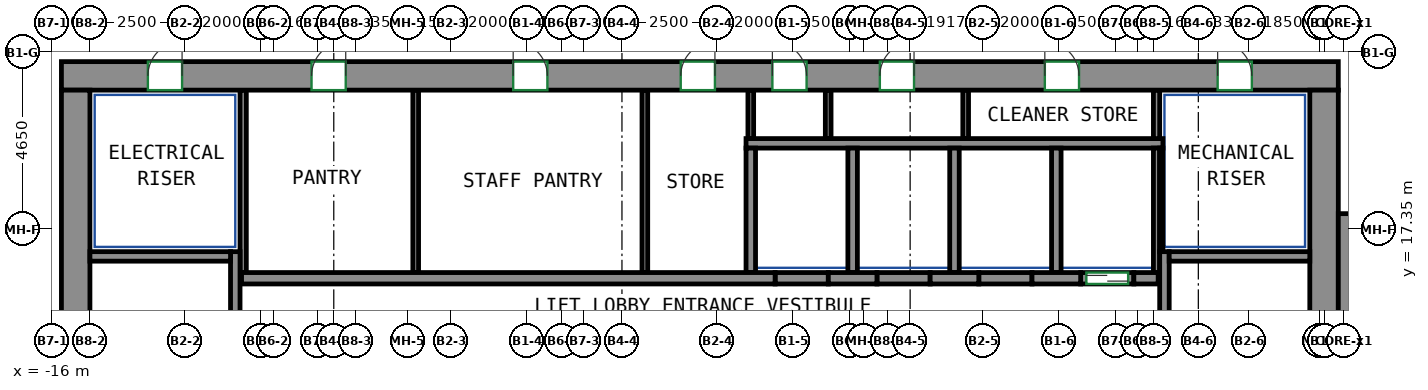
"""IFC4 building model, lengths in metres.
Left out: names, types, materials, properties, quantities, classifications, styles, units other than length and angle.
Written with IfcOpenShell. Run it as: python <this file> out.ifc"""

import sys

from ifc_helpers import new_model, si_unit, direction, frame, frame_2d, origin, place, context, subcontext, project, spatial, rectangle, extrude, source, transform, mapped, element, fill, save


model = new_model("IFC4")
c1 = context("Model", 3, precision=1e-05, world=origin(), true_north=direction((0.0, 1.0)))
c2 = subcontext(c1, "Body", "Model", "MODEL_VIEW")
j1 = project(units=[si_unit("LENGTHUNIT", "METRE"), si_unit("PLANEANGLEUNIT", "RADIAN")], contexts=[c1])
p1 = place(None, origin())
s1 = spatial("IfcSite", under=j1, at=p1, CompositionType="ELEMENT")
p2 = place(p1, origin())
s2 = spatial("IfcBuilding", under=s1, at=p2, CompositionType="ELEMENT")
p3 = place(p2, frame((0.0, 0.0, 192.3)))
s3 = spatial("IfcBuildingStorey", under=s2, at=p3, CompositionType="ELEMENT", Elevation=192.3)
m1 = source(origin(), c2, "Body", "SweptSolid", [
    extrude(rectangle(XDim=33.6, YDim=0.75, at=frame_2d((16.8, 0.0))), origin(), (0.0, 0.0, 1.0), 3.0),
])
p4 = place(p3, frame((-15.75, 21.375, 0.0), z_axis=(0.0, 0.0, 1.0), x_axis=(1.0, 0.0, 0.0)))
e1 = element("IfcWall", 1, at=p4, inside=s3, PredefinedType="SHEAR", context=c2, shape_type="MappedRepresentation", body=[
    mapped(m1, transform((0.0, 0.0, 0.0))),
])
p5 = place(p4, frame((6.581, 0.0, 0.0)))
e2 = element("IfcOpeningElement", 2, at=p5, cuts=e1, PredefinedType="OPENING", context=c2, shape_type="SweptSolid", body=[
    extrude(rectangle(XDim=0.9, YDim=2.1, at=frame_2d((0.45, 1.05))), frame((0.0, 0.385, 0.0), z_axis=(0.0, -1.0, 0.0), x_axis=(1.0, 0.0, 0.0)), (0.0, 0.0, 1.0), 0.77),
])
p6 = place(p4, frame((11.888, 0.0, 0.0)))
e3 = element("IfcOpeningElement", 3, at=p6, cuts=e1, PredefinedType="OPENING", context=c2, shape_type="SweptSolid", body=[
    extrude(rectangle(XDim=0.9, YDim=2.1, at=frame_2d((0.45, 1.05))), frame((0.0, 0.385, 0.0), z_axis=(0.0, -1.0, 0.0), x_axis=(1.0, 0.0, 0.0)), (0.0, 0.0, 1.0), 0.77),
])
p7 = place(p4, frame((16.296, 0.0, 0.0)))
e4 = element("IfcOpeningElement", 4, at=p7, cuts=e1, PredefinedType="OPENING", context=c2, shape_type="SweptSolid", body=[
    extrude(rectangle(XDim=0.9, YDim=2.1, at=frame_2d((0.45, 1.05))), frame((0.0, 0.385, 0.0), z_axis=(0.0, -1.0, 0.0), x_axis=(1.0, 0.0, 0.0)), (0.0, 0.0, 1.0), 0.77),
])
p8 = place(p4, frame((18.708, 0.0, 0.0)))
e5 = element("IfcOpeningElement", 5, at=p8, cuts=e1, PredefinedType="OPENING", context=c2, shape_type="SweptSolid", body=[
    extrude(rectangle(XDim=0.9, YDim=2.1, at=frame_2d((0.45, 1.05))), frame((0.0, 0.385, 0.0), z_axis=(0.0, -1.0, 0.0), x_axis=(1.0, 0.0, 0.0)), (0.0, 0.0, 1.0), 0.77),
])
p9 = place(p4, frame((21.536, 0.0, 0.0)))
e6 = element("IfcOpeningElement", 6, at=p9, cuts=e1, PredefinedType="OPENING", context=c2, shape_type="SweptSolid", body=[
    extrude(rectangle(XDim=0.9, YDim=2.1, at=frame_2d((0.45, 1.05))), frame((0.0, 0.385, 0.0), z_axis=(0.0, -1.0, 0.0), x_axis=(1.0, 0.0, 0.0)), (0.0, 0.0, 1.0), 0.77),
])
p10 = place(p4, frame((25.877, 0.0, 0.0)))
e7 = element("IfcOpeningElement", 7, at=p10, cuts=e1, PredefinedType="OPENING", context=c2, shape_type="SweptSolid", body=[
    extrude(rectangle(XDim=0.9, YDim=2.1, at=frame_2d((0.45, 1.05))), frame((0.0, 0.385, 0.0), z_axis=(0.0, -1.0, 0.0), x_axis=(1.0, 0.0, 0.0)), (0.0, 0.0, 1.0), 0.77),
])
p11 = place(p4, frame((2.275, 0.0, 0.0)))
e8 = element("IfcOpeningElement", 8, at=p11, cuts=e1, PredefinedType="OPENING", context=c2, shape_type="SweptSolid", body=[
    extrude(rectangle(XDim=0.9, YDim=2.1, at=frame_2d((0.45, 1.05))), frame((0.0, 0.385, 0.0), z_axis=(0.0, -1.0, 0.0), x_axis=(1.0, 0.0, 0.0)), (0.0, 0.0, 1.0), 0.77),
])
p12 = place(p4, frame((30.425, 0.0, 0.0)))
e9 = element("IfcOpeningElement", 9, at=p12, cuts=e1, PredefinedType="OPENING", context=c2, shape_type="SweptSolid", body=[
    extrude(rectangle(XDim=0.9, YDim=2.1, at=frame_2d((0.45, 1.05))), frame((0.0, 0.385, 0.0), z_axis=(0.0, -1.0, 0.0), x_axis=(1.0, 0.0, 0.0)), (0.0, 0.0, 1.0), 0.77),
])
m2 = source(origin(), c2, "Body", "SweptSolid", [
    extrude(rectangle(XDim=12.0, YDim=0.75, at=frame_2d((6.0, 0.0))), origin(), (0.0, 0.0, 1.0), 3.0),
])
for number, where, z_axis, x_axis in (
    (10, (-15.375, 9.0, 0.0), (0.0, 0.0, 1.0), (0.0, 1.0, 0.0)),
    (11, (17.475, 9.0, 0.0), (0.0, 0.0, 1.0), (0.0, 1.0, 0.0)),
):
    element("IfcWall", number, at=place(p3, frame(where, z_axis=z_axis, x_axis=x_axis)), inside=s3, PredefinedType="SHEAR", context=c2, shape_type="MappedRepresentation", body=[
        mapped(m2, transform((0.0, 0.0, 0.0))),
    ])
m3 = source(origin(), c2, "Body", "SweptSolid", [
    extrude(rectangle(XDim=7.75, YDim=0.25, at=frame_2d((3.875, 0.0))), origin(), (0.0, 0.0, 1.0), 3.0),
])
p13 = place(p3, frame((-11.175, 9.0, 0.0), z_axis=(0.0, 0.0, 1.0), x_axis=(0.0, 1.0, 0.0)))
e12 = element("IfcWall", 12, at=p13, inside=s3, PredefinedType="SHEAR", context=c2, shape_type="MappedRepresentation", body=[
    mapped(m3, transform((0.0, 0.0, 0.0))),
])
m4 = source(origin(), c2, "Body", "SweptSolid", [
    extrude(rectangle(XDim=3.7, YDim=0.25, at=frame_2d((1.85, 0.0))), origin(), (0.0, 0.0, 1.0), 3.0),
])
p14 = place(p3, frame((-15.0, 16.625, 0.0), z_axis=(0.0, 0.0, 1.0), x_axis=(1.0, 0.0, 0.0)))
e13 = element("IfcWall", 13, at=p14, inside=s3, PredefinedType="SHEAR", context=c2, shape_type="MappedRepresentation", body=[
    mapped(m4, transform((0.0, 0.0, 0.0))),
])
p15 = place(p3, frame((13.275, 9.0, 0.0), z_axis=(0.0, 0.0, 1.0), x_axis=(0.0, 1.0, 0.0)))
e14 = element("IfcWall", 14, at=p15, inside=s3, PredefinedType="SHEAR", context=c2, shape_type="MappedRepresentation", body=[
    mapped(m3, transform((0.0, 0.0, 0.0))),
])
m5 = source(origin(), c2, "Body", "SweptSolid", [
    extrude(rectangle(XDim=3.7, YDim=0.25, at=frame_2d((1.85, 0.0))), origin(), (0.0, 0.0, 1.0), 3.0),
])
p16 = place(p3, frame((13.4, 16.625, 0.0), z_axis=(0.0, 0.0, 1.0), x_axis=(1.0, 0.0, 0.0)))
e15 = element("IfcWall", 15, at=p16, inside=s3, PredefinedType="SHEAR", context=c2, shape_type="MappedRepresentation", body=[
    mapped(m5, transform((0.0, 0.0, 0.0))),
])
m6 = source(origin(), c2, "Body", "SweptSolid", [
    extrude(rectangle(XDim=8.0, YDim=0.5, at=frame_2d((4.0, 0.0))), origin(), (0.0, 0.0, 1.0), 3.0),
])
p17 = place(p3, frame((18.1, 9.75, 0.0), z_axis=(0.0, 0.0, 1.0), x_axis=(0.0, 1.0, 0.0)))
e16 = element("IfcWall", 16, at=p17, inside=s3, PredefinedType="SHEAR", context=c2, shape_type="MappedRepresentation", body=[
    mapped(m6, transform((0.0, 0.0, 0.0))),
])
m7 = source(origin(), c2, "Body", "SweptSolid", [
    extrude(rectangle(XDim=14.04, YDim=0.3, at=frame_2d((7.02, 0.0))), origin(), (0.0, 0.0, 1.0), 3.0),
])
p18 = place(p3, frame((-11.01, 16.05, 0.0), z_axis=(0.0, 0.0, 1.0), x_axis=(1.0, 0.0, 0.0)))
e17 = element("IfcWall", 17, at=p18, inside=s3, PredefinedType="SHEAR", context=c2, shape_type="MappedRepresentation", body=[
    mapped(m7, transform((0.0, 0.0, 0.0))),
])
m8 = source(origin(), c2, "Body", "SweptSolid", [
    extrude(rectangle(XDim=1.28, YDim=0.3, at=frame_2d((0.64, 0.0))), origin(), (0.0, 0.0, 1.0), 3.0),
])
p19 = place(p3, frame((4.43, 16.05, 0.0), z_axis=(0.0, 0.0, 1.0), x_axis=(1.0, 0.0, 0.0)))
e18 = element("IfcWall", 18, at=p19, inside=s3, PredefinedType="SHEAR", context=c2, shape_type="MappedRepresentation", body=[
    mapped(m8, transform((0.0, 0.0, 0.0))),
])
m9 = source(origin(), c2, "Body", "SweptSolid", [
    extrude(rectangle(XDim=1.28, YDim=0.3, at=frame_2d((0.64, 0.0))), origin(), (0.0, 0.0, 1.0), 3.0),
])
p20 = place(p3, frame((7.11, 16.05, 0.0), z_axis=(0.0, 0.0, 1.0), x_axis=(1.0, 0.0, 0.0)))
e19 = element("IfcWall", 19, at=p20, inside=s3, PredefinedType="SHEAR", context=c2, shape_type="MappedRepresentation", body=[
    mapped(m9, transform((0.0, 0.0, 0.0))),
])
p21 = place(p3, frame((9.79, 16.05, 0.0), z_axis=(0.0, 0.0, 1.0), x_axis=(1.0, 0.0, 0.0)))
e20 = element("IfcWall", 20, at=p21, inside=s3, PredefinedType="SHEAR", context=c2, shape_type="MappedRepresentation", body=[
    mapped(m8, transform((0.0, 0.0, 0.0))),
])
m10 = source(origin(), c2, "Body", "SweptSolid", [
    extrude(rectangle(XDim=0.64, YDim=0.3, at=frame_2d((0.32, 0.0))), origin(), (0.0, 0.0, 1.0), 3.0),
])
p22 = place(p3, frame((12.47, 16.05, 0.0), z_axis=(0.0, 0.0, 1.0), x_axis=(1.0, 0.0, 0.0)))
e21 = element("IfcWall", 21, at=p22, inside=s3, PredefinedType="SHEAR", context=c2, shape_type="MappedRepresentation", body=[
    mapped(m10, transform((0.0, 0.0, 0.0))),
])
m11 = source(origin(), c2, "Body", "SweptSolid", [
    extrude(rectangle(XDim=1.4, YDim=0.3, at=frame_2d((0.7, 0.0))), origin(), (0.0, 0.0, 1.0), 3.0),
])
p23 = place(p3, frame((11.07, 16.05, 0.0), z_axis=(0.0, 0.0, 1.0), x_axis=(1.0, 0.0, 0.0)))
e22 = element("IfcWall", 22, at=p23, inside=s3, PredefinedType="PARTITIONING", context=c2, shape_type="MappedRepresentation", body=[
    mapped(m11, transform((0.0, 0.0, 0.0))),
])
p24 = place(p23, frame((0.15, 0.0, 0.0)))
e23 = element("IfcOpeningElement", 23, at=p24, cuts=e22, PredefinedType="OPENING", context=c2, shape_type="SweptSolid", body=[
    extrude(rectangle(XDim=1.1, YDim=2.1, at=frame_2d((0.55, 1.05))), frame((0.0, 0.16, 0.0), z_axis=(0.0, -1.0, 0.0), x_axis=(1.0, 0.0, 0.0)), (0.0, 0.0, 1.0), 0.32),
])
p25 = place(p3, frame((3.03, 16.05, 0.0), z_axis=(0.0, 0.0, 1.0), x_axis=(1.0, 0.0, 0.0)))
e24 = element("IfcWall", 24, at=p25, inside=s3, PredefinedType="PARTITIONING", context=c2, shape_type="MappedRepresentation", body=[
    mapped(m11, transform((0.0, 0.0, 0.0))),
])
m12 = source(origin(), c2, "Body", "SweptSolid", [
    extrude(rectangle(XDim=1.4, YDim=0.3, at=frame_2d((0.7, 0.0))), origin(), (0.0, 0.0, 1.0), 3.0),
])
for number, where, z_axis, x_axis in (
    (25, (5.71, 16.05, 0.0), (0.0, 0.0, 1.0), (1.0, 0.0, 0.0)),
    (26, (8.39, 16.05, 0.0), (0.0, 0.0, 1.0), (1.0, 0.0, 0.0)),
):
    element("IfcWall", number, at=place(p3, frame(where, z_axis=z_axis, x_axis=x_axis)), inside=s3, PredefinedType="PARTITIONING", context=c2, shape_type="MappedRepresentation", body=[
        mapped(m12, transform((0.0, 0.0, 0.0))),
    ])
m13 = source(origin(), c2, "Body", "SweptSolid", [
    extrude(rectangle(XDim=10.97, YDim=0.25, at=frame_2d((5.485, 0.0))), origin(), (0.0, 0.0, 1.0), 3.0),
])
p26 = place(p3, frame((2.265, 19.6, 0.0), z_axis=(0.0, 0.0, 1.0), x_axis=(1.0, 0.0, 0.0)))
e27 = element("IfcWall", 27, at=p26, inside=s3, PredefinedType="PARTITIONING", context=c2, shape_type="MappedRepresentation", body=[
    mapped(m13, transform((0.0, 0.0, 0.0))),
])
m14 = source(origin(), c2, "Body", "SweptSolid", [
    extrude(rectangle(XDim=3.275, YDim=0.165, at=frame_2d((1.638, 0.0))), origin(), (0.0, 0.0, 1.0), 3.0),
])
p27 = place(p3, frame((13.067, 16.2, 0.0), z_axis=(0.0, 0.0, 1.0), x_axis=(0.0, 1.0, 0.0)))
e28 = element("IfcWall", 28, at=p27, inside=s3, PredefinedType="PARTITIONING", context=c2, shape_type="MappedRepresentation", body=[
    mapped(m14, transform((0.0, 0.0, 0.0))),
])
m15 = source(origin(), c2, "Body", "SweptSolid", [
    extrude(rectangle(XDim=1.275, YDim=0.165, at=frame_2d((0.637, 0.0))), origin(), (0.0, 0.0, 1.0), 3.0),
])
p28 = place(p3, frame((13.067, 19.725, 0.0), z_axis=(0.0, 0.0, 1.0), x_axis=(0.0, 1.0, 0.0)))
e29 = element("IfcWall", 29, at=p28, inside=s3, PredefinedType="PARTITIONING", context=c2, shape_type="MappedRepresentation", body=[
    mapped(m15, transform((0.0, 0.0, 0.0))),
])
m16 = source(origin(), c2, "Body", "SweptSolid", [
    extrude(rectangle(XDim=4.8, YDim=0.165, at=frame_2d((2.4, 0.0))), origin(), (0.0, 0.0, 1.0), 3.0),
])
p29 = place(p3, frame((-10.968, 16.2, 0.0), z_axis=(0.0, 0.0, 1.0), x_axis=(0.0, 1.0, 0.0)))
e30 = element("IfcWall", 30, at=p29, inside=s3, PredefinedType="PARTITIONING", context=c2, shape_type="MappedRepresentation", body=[
    mapped(m16, transform((0.0, 0.0, 0.0))),
])
m17 = source(origin(), c2, "Body", "SweptSolid", [
    extrude(rectangle(XDim=3.275, YDim=0.25, at=frame_2d((1.638, 0.0))), origin(), (0.0, 0.0, 1.0), 3.0),
])
p30 = place(p3, frame((10.43, 16.2, 0.0), z_axis=(0.0, 0.0, 1.0), x_axis=(0.0, 1.0, 0.0)))
e31 = element("IfcWall", 31, at=p30, inside=s3, PredefinedType="PARTITIONING", context=c2, shape_type="MappedRepresentation", body=[
    mapped(m17, transform((0.0, 0.0, 0.0))),
])
m18 = source(origin(), c2, "Body", "SweptSolid", [
    extrude(rectangle(XDim=2.725, YDim=0.085, at=frame_2d((1.363, 0.0))), origin(), (0.0, 0.0, 1.0), 3.0),
])
p31 = place(p3, frame((13.192, 16.75, 0.0), z_axis=(0.0, 0.0, 1.0), x_axis=(0.0, 1.0, 0.0)))
e32 = element("IfcWall", 32, at=p31, inside=s3, PredefinedType="PARTITIONING", context=c2, shape_type="MappedRepresentation", body=[
    mapped(m18, transform((0.0, 0.0, 0.0))),
])
for number, where, z_axis, x_axis in (
    (33, (2.39, 16.2, 0.0), (0.0, 0.0, 1.0), (0.0, 1.0, 0.0)),
    (34, (5.07, 16.2, 0.0), (0.0, 0.0, 1.0), (0.0, 1.0, 0.0)),
    (35, (7.75, 16.2, 0.0), (0.0, 0.0, 1.0), (0.0, 1.0, 0.0)),
):
    element("IfcWall", number, at=place(p3, frame(where, z_axis=z_axis, x_axis=x_axis)), inside=s3, PredefinedType="PARTITIONING", context=c2, shape_type="MappedRepresentation", body=[
        mapped(m17, transform((0.0, 0.0, 0.0))),
    ])
m19 = source(origin(), c2, "Body", "SweptSolid", [
    extrude(rectangle(XDim=4.8, YDim=0.15, at=frame_2d((2.4, 0.0))), origin(), (0.0, 0.0, 1.0), 3.0),
])
for number, where, z_axis, x_axis in (
    (36, (-6.427, 16.2, 0.0), (0.0, 0.0, 1.0), (0.0, 1.0, 0.0)),
    (37, (-0.397, 16.2, 0.0), (0.0, 0.0, 1.0), (0.0, 1.0, 0.0)),
):
    element("IfcWall", number, at=place(p3, frame(where, z_axis=z_axis, x_axis=x_axis)), inside=s3, PredefinedType="PARTITIONING", context=c2, shape_type="MappedRepresentation", body=[
        mapped(m19, transform((0.0, 0.0, 0.0))),
    ])
m20 = source(origin(), c2, "Body", "SweptSolid", [
    extrude(rectangle(XDim=1.275, YDim=0.15, at=frame_2d((0.637, 0.0))), origin(), (0.0, 0.0, 1.0), 3.0),
])
for number, where, z_axis, x_axis in (
    (38, (2.39, 19.725, 0.0), (0.0, 0.0, 1.0), (0.0, 1.0, 0.0)),
    (39, (4.427, 19.725, 0.0), (0.0, 0.0, 1.0), (0.0, 1.0, 0.0)),
    (40, (8.045, 19.725, 0.0), (0.0, 0.0, 1.0), (0.0, 1.0, 0.0)),
):
    element("IfcWall", number, at=place(p3, frame(where, z_axis=z_axis, x_axis=x_axis)), inside=s3, PredefinedType="PARTITIONING", context=c2, shape_type="MappedRepresentation", body=[
        mapped(m20, transform((0.0, 0.0, 0.0))),
    ])
p32 = place(p24, origin())
e41 = element("IfcDoor", 41, at=p32, inside=s3, OperationType="DOUBLE_DOOR_SLIDING", PredefinedType="DOOR", context=c2, shape_type="SweptSolid", body=[
    extrude(rectangle(XDim=1.1, YDim=2.1, at=frame_2d((0.55, 1.05))), frame((0.0, 0.025, 0.0), z_axis=(0.0, -1.0, 0.0), x_axis=(1.0, 0.0, 0.0)), (0.0, 0.0, 1.0), 0.05),
])
fill(e23, e41)
p33 = place(p5, origin())
e42 = element("IfcDoor", 42, at=p33, inside=s3, OperationType="SINGLE_SWING_RIGHT", PredefinedType="DOOR", context=c2, shape_type="SweptSolid", body=[
    extrude(rectangle(XDim=0.9, YDim=2.1, at=frame_2d((0.45, 1.05))), frame((0.0, -0.23, 0.0), z_axis=(0.0, -1.0, 0.0), x_axis=(1.0, 0.0, 0.0)), (0.0, 0.0, 1.0), 0.05),
])
fill(e2, e42)
p34 = place(p6, origin())
e43 = element("IfcDoor", 43, at=p34, inside=s3, OperationType="SINGLE_SWING_LEFT", PredefinedType="DOOR", context=c2, shape_type="SweptSolid", body=[
    extrude(rectangle(XDim=0.9, YDim=2.1, at=frame_2d((0.45, 1.05))), frame((0.0, -0.23, 0.0), z_axis=(0.0, -1.0, 0.0), x_axis=(1.0, 0.0, 0.0)), (0.0, 0.0, 1.0), 0.05),
])
fill(e3, e43)
p35 = place(p7, origin())
e44 = element("IfcDoor", 44, at=p35, inside=s3, OperationType="SINGLE_SWING_RIGHT", PredefinedType="DOOR", context=c2, shape_type="SweptSolid", body=[
    extrude(rectangle(XDim=0.9, YDim=2.1, at=frame_2d((0.45, 1.05))), frame((0.0, -0.23, 0.0), z_axis=(0.0, -1.0, 0.0), x_axis=(1.0, 0.0, 0.0)), (0.0, 0.0, 1.0), 0.05),
])
fill(e4, e44)
p36 = place(p8, origin())
e45 = element("IfcDoor", 45, at=p36, inside=s3, OperationType="SINGLE_SWING_LEFT", PredefinedType="DOOR", context=c2, shape_type="SweptSolid", body=[
    extrude(rectangle(XDim=0.9, YDim=2.1, at=frame_2d((0.45, 1.05))), frame((0.0, -0.23, 0.0), z_axis=(0.0, -1.0, 0.0), x_axis=(1.0, 0.0, 0.0)), (0.0, 0.0, 1.0), 0.05),
])
fill(e5, e45)
p37 = place(p9, origin())
e46 = element("IfcDoor", 46, at=p37, inside=s3, OperationType="SINGLE_SWING_RIGHT", PredefinedType="DOOR", context=c2, shape_type="SweptSolid", body=[
    extrude(rectangle(XDim=0.9, YDim=2.1, at=frame_2d((0.45, 1.05))), frame((0.0, -0.23, 0.0), z_axis=(0.0, -1.0, 0.0), x_axis=(1.0, 0.0, 0.0)), (0.0, 0.0, 1.0), 0.05),
])
fill(e6, e46)
p38 = place(p10, origin())
e47 = element("IfcDoor", 47, at=p38, inside=s3, OperationType="SINGLE_SWING_LEFT", PredefinedType="DOOR", context=c2, shape_type="SweptSolid", body=[
    extrude(rectangle(XDim=0.9, YDim=2.1, at=frame_2d((0.45, 1.05))), frame((0.0, -0.23, 0.0), z_axis=(0.0, -1.0, 0.0), x_axis=(1.0, 0.0, 0.0)), (0.0, 0.0, 1.0), 0.05),
])
fill(e7, e47)
p39 = place(p11, origin())
e48 = element("IfcDoor", 48, at=p39, inside=s3, OperationType="SINGLE_SWING_RIGHT", PredefinedType="DOOR", context=c2, shape_type="SweptSolid", body=[
    extrude(rectangle(XDim=0.9, YDim=2.1, at=frame_2d((0.45, 1.05))), frame((0.0, -0.23, 0.0), z_axis=(0.0, -1.0, 0.0), x_axis=(1.0, 0.0, 0.0)), (0.0, 0.0, 1.0), 0.05),
])
fill(e8, e48)
p40 = place(p12, origin())
e49 = element("IfcDoor", 49, at=p40, inside=s3, OperationType="SINGLE_SWING_LEFT", PredefinedType="DOOR", context=c2, shape_type="SweptSolid", body=[
    extrude(rectangle(XDim=0.9, YDim=2.1, at=frame_2d((0.45, 1.05))), frame((0.0, -0.23, 0.0), z_axis=(0.0, -1.0, 0.0), x_axis=(1.0, 0.0, 0.0)), (0.0, 0.0, 1.0), 0.05),
])
fill(e9, e49)
save(model, sys.argv[1])
